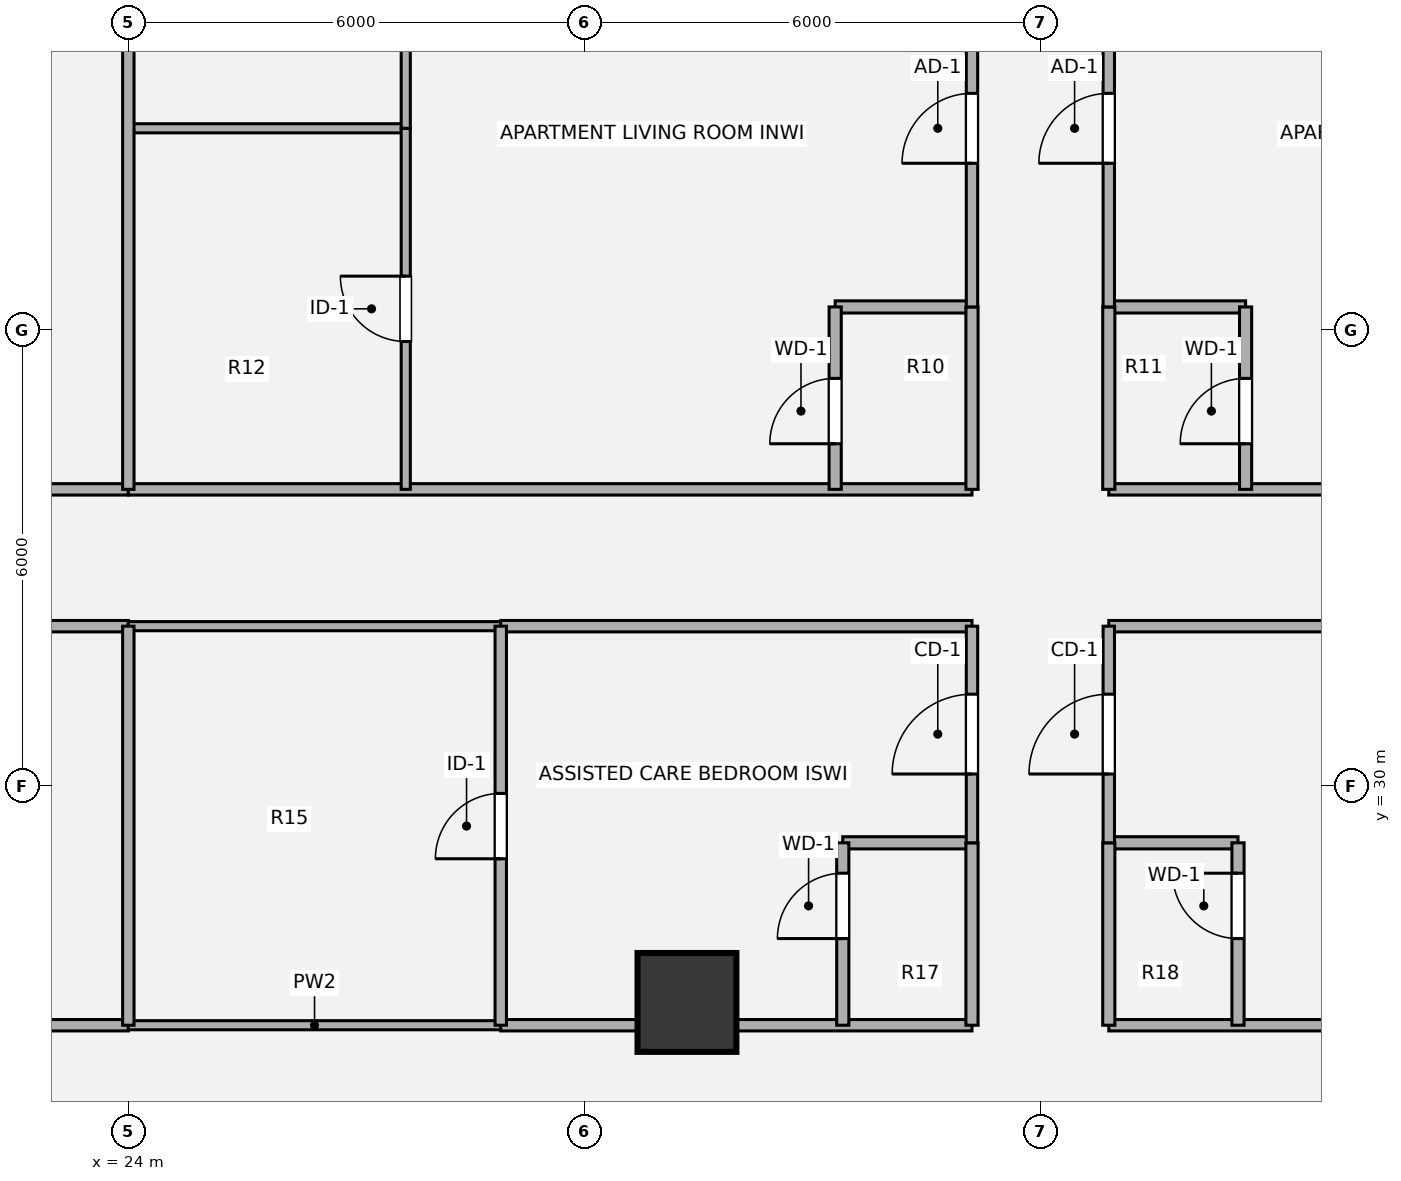
"""IFC4 building model, lengths in metres.
Left out: names, types, materials, properties, quantities, classifications, styles, units other than length and angle.
Written with IfcOpenShell. Run it as: python <this file> out.ifc"""

import sys

from ifc_helpers import new_model, si_unit, direction, frame, frame_2d, origin, origin_2d, place, context, subcontext, project, spatial, rectangle, hollow_circle, extrude, source, transform, mapped, element, fill, save


model = new_model("IFC4")
c1 = context("Model", 3, precision=1e-05, world=origin(), true_north=direction((0.0, 1.0)))
c2 = subcontext(c1, "Body", "Model", "MODEL_VIEW")
j1 = project(units=[si_unit("LENGTHUNIT", "METRE"), si_unit("PLANEANGLEUNIT", "RADIAN")], contexts=[c1])
p1 = place(None, origin())
s1 = spatial("IfcSite", under=j1, at=p1, CompositionType="ELEMENT")
p2 = place(p1, origin())
s2 = spatial("IfcBuilding", under=s1, at=p2, CompositionType="ELEMENT")
p3 = place(p2, frame((0.0, 0.0, 93.6)))
s3 = spatial("IfcBuildingStorey", under=s2, at=p3, CompositionType="ELEMENT", Elevation=93.6)
m1 = source(origin(), c2, "Body", "SweptSolid", [
    extrude(hollow_circle(Radius=0.65, WallThickness=0.045, at=origin_2d()), origin(), (0.0, 0.0, 1.0), 3.78),
])
p4 = place(p3, frame((31.35, 27.15, 0.0), z_axis=(0.0, 0.0, 1.0), x_axis=(1.0, 0.0, 0.0)))
e1 = element("IfcColumn", 1, at=p4, inside=s3, PredefinedType="COLUMN", context=c2, shape_type="MappedRepresentation", body=[
    mapped(m1, transform((0.0, 0.0, 0.0), x_axis=(1.0, 0.0, 0.0), y_axis=(0.0, 1.0, 0.0), z_axis=(0.0, 0.0, 1.0), scale=1.0)),
])
p5 = place(p3, frame((14.051, 26.85, 0.0), z_axis=(0.0, 0.0, 1.0), x_axis=(1.0, 0.0, 0.0)))
e2 = element("IfcWall", 2, at=p5, inside=s3, PredefinedType="PARTITIONING", context=c2, shape_type="SweptSolid", body=[
    extrude(rectangle(XDim=9.949, YDim=0.15, at=frame_2d((4.974, 0.0))), origin(), (0.0, 0.0, 1.0), 3.055),
])
p6 = place(p3, frame((24.0, 26.85, 0.0), z_axis=(0.0, 0.0, 1.0), x_axis=(1.0, 0.0, 0.0)))
e3 = element("IfcWall", 3, at=p6, inside=s3, PredefinedType="PARTITIONING", context=c2, shape_type="SweptSolid", body=[
    extrude(rectangle(XDim=4.9, YDim=0.12, at=frame_2d((2.45, 0.0))), origin(), (0.0, 0.0, 1.0), 3.055),
])
for number, where, z_axis, x_axis in (
    (4, (28.9, 26.85, 0.0), (0.0, 0.0, 1.0), (1.0, 0.0, 0.0)),
    (5, (36.9, 26.85, 0.0), (0.0, 0.0, 1.0), (1.0, 0.0, 0.0)),
):
    element("IfcWall", number, at=place(p3, frame(where, z_axis=z_axis, x_axis=x_axis)), inside=s3, PredefinedType="PARTITIONING", context=c2, shape_type="SweptSolid", body=[
        extrude(rectangle(XDim=6.2, YDim=0.15, at=frame_2d((3.1, 0.0))), origin(), (0.0, 0.0, 1.0), 2.903),
    ])
for number, where, z_axis, x_axis in (
    (6, (33.4, 29.25, 0.0), (0.0, 0.0, 1.0), (1.0, 0.0, 0.0)),
    (7, (36.9, 29.25, 0.0), (0.0, 0.0, 1.0), (1.0, 0.0, 0.0)),
):
    element("IfcWall", number, at=place(p3, frame(where, z_axis=z_axis, x_axis=x_axis)), inside=s3, PredefinedType="PLUMBINGWALL", context=c2, shape_type="SweptSolid", body=[
        extrude(rectangle(XDim=1.7, YDim=0.16, at=frame_2d((0.85, 0.0))), origin(), (0.0, 0.0, 1.0), 3.259),
    ])
p7 = place(p3, frame((13.98, 32.1, 0.0), z_axis=(0.0, 0.0, 1.0), x_axis=(1.0, 0.0, 0.0)))
e8 = element("IfcWall", 8, at=p7, inside=s3, PredefinedType="PARTITIONING", context=c2, shape_type="SweptSolid", body=[
    extrude(rectangle(XDim=10.02, YDim=0.15, at=frame_2d((5.01, 0.0))), origin(), (0.0, 0.0, 1.0), 2.982),
])
p8 = place(p7, frame((6.695, 0.0, 0.0)))
e9 = element("IfcOpeningElement", 9, at=p8, cuts=e8, PredefinedType="OPENING", context=c2, shape_type="SweptSolid", body=[
    extrude(rectangle(XDim=1.05, YDim=2.1, at=origin_2d()), frame((0.525, 0.085, 1.05), z_axis=(0.0, -1.0, 0.0), x_axis=(1.0, 0.0, 0.0)), (0.0, 0.0, 1.0), 0.17),
])
p9 = place(p3, frame((24.0, 32.1, 0.0), z_axis=(0.0, 0.0, 1.0), x_axis=(1.0, 0.0, 0.0)))
e10 = element("IfcWall", 10, at=p9, inside=s3, PredefinedType="PARTITIONING", context=c2, shape_type="SweptSolid", body=[
    extrude(rectangle(XDim=4.9, YDim=0.12, at=frame_2d((2.45, 0.0))), origin(), (0.0, 0.0, 1.0), 2.982),
])
for number, where, z_axis, x_axis in (
    (11, (28.9, 32.1, 0.0), (0.0, 0.0, 1.0), (1.0, 0.0, 0.0)),
    (12, (36.9, 32.1, 0.0), (0.0, 0.0, 1.0), (1.0, 0.0, 0.0)),
):
    element("IfcWall", number, at=place(p3, frame(where, z_axis=z_axis, x_axis=x_axis)), inside=s3, PredefinedType="PARTITIONING", context=c2, shape_type="SweptSolid", body=[
        extrude(rectangle(XDim=6.2, YDim=0.15, at=frame_2d((3.1, 0.0))), origin(), (0.0, 0.0, 1.0), 2.982),
    ])
p10 = place(p3, frame((13.98, 33.9, 0.0), z_axis=(0.0, 0.0, 1.0), x_axis=(1.0, 0.0, 0.0)))
e13 = element("IfcWall", 13, at=p10, inside=s3, PredefinedType="PARTITIONING", context=c2, shape_type="SweptSolid", body=[
    extrude(rectangle(XDim=10.02, YDim=0.15, at=frame_2d((5.01, 0.0))), origin(), (0.0, 0.0, 1.0), 2.982),
])
p11 = place(p10, frame((6.695, 0.0, 0.0)))
e14 = element("IfcOpeningElement", 14, at=p11, cuts=e13, PredefinedType="OPENING", context=c2, shape_type="SweptSolid", body=[
    extrude(rectangle(XDim=1.05, YDim=2.1, at=origin_2d()), frame((0.525, 0.085, 1.05), z_axis=(0.0, -1.0, 0.0), x_axis=(1.0, 0.0, 0.0)), (0.0, 0.0, 1.0), 0.17),
])
for number, where, z_axis, x_axis in (
    (15, (24.0, 33.9, 0.0), (0.0, 0.0, 1.0), (1.0, 0.0, 0.0)),
    (16, (36.9, 33.9, 0.0), (0.0, 0.0, 1.0), (1.0, 0.0, 0.0)),
):
    element("IfcWall", number, at=place(p3, frame(where, z_axis=z_axis, x_axis=x_axis)), inside=s3, PredefinedType="PARTITIONING", context=c2, shape_type="SweptSolid", body=[
        extrude(rectangle(XDim=11.1, YDim=0.15, at=frame_2d((5.55, 0.0))), origin(), (0.0, 0.0, 1.0), 2.982),
    ])
for number, where, z_axis, x_axis in (
    (17, (33.3, 36.3, 0.0), (0.0, 0.0, 1.0), (1.0, 0.0, 0.0)),
    (18, (36.9, 36.3, 0.0), (0.0, 0.0, 1.0), (1.0, 0.0, 0.0)),
):
    element("IfcWall", number, at=place(p3, frame(where, z_axis=z_axis, x_axis=x_axis)), inside=s3, PredefinedType="PLUMBINGWALL", context=c2, shape_type="SweptSolid", body=[
        extrude(rectangle(XDim=1.8, YDim=0.16, at=frame_2d((0.9, 0.0))), origin(), (0.0, 0.0, 1.0), 3.259),
    ])
p12 = place(p3, frame((24.0, 38.65, 0.0), z_axis=(0.0, 0.0, 1.0), x_axis=(1.0, 0.0, 0.0)))
e19 = element("IfcWall", 19, at=p12, inside=s3, PredefinedType="PARTITIONING", context=c2, shape_type="SweptSolid", body=[
    extrude(rectangle(XDim=3.65, YDim=0.12, at=frame_2d((1.825, 0.0))), origin(), (0.0, 0.0, 1.0), 2.903),
])
p13 = place(p3, frame((24.0, 26.85, 0.0), z_axis=(0.0, 0.0, 1.0), x_axis=(0.0, 1.0, 0.0)))
e20 = element("IfcWall", 20, at=p13, inside=s3, PredefinedType="PARTITIONING", context=c2, shape_type="SweptSolid", body=[
    extrude(rectangle(XDim=5.25, YDim=0.15, at=frame_2d((2.625, 0.0))), origin(), (0.0, 0.0, 1.0), 3.5),
])
p14 = place(p3, frame((24.0, 33.9, 0.0), z_axis=(0.0, 0.0, 1.0), x_axis=(0.0, 1.0, 0.0)))
e21 = element("IfcWall", 21, at=p14, inside=s3, PredefinedType="PARTITIONING", context=c2, shape_type="SweptSolid", body=[
    extrude(rectangle(XDim=13.421, YDim=0.15, at=frame_2d((6.71, 0.0))), origin(), (0.0, 0.0, 1.0), 3.5),
])
p15 = place(p3, frame((27.65, 33.9, 0.0), z_axis=(0.0, 0.0, 1.0), x_axis=(0.0, 1.0, 0.0)))
e22 = element("IfcWall", 22, at=p15, inside=s3, PredefinedType="PARTITIONING", context=c2, shape_type="SweptSolid", body=[
    extrude(rectangle(XDim=4.75, YDim=0.12, at=frame_2d((2.375, 0.0))), origin(), (0.0, 0.0, 1.0), 3.5),
])
p16 = place(p15, frame((1.945, 0.0, 0.0)))
e23 = element("IfcOpeningElement", 23, at=p16, cuts=e22, PredefinedType="OPENING", context=c2, shape_type="SweptSolid", body=[
    extrude(rectangle(XDim=0.86, YDim=2.1, at=origin_2d()), frame((0.43, 0.07, 1.05), z_axis=(0.0, -1.0, 0.0), x_axis=(1.0, 0.0, 0.0)), (0.0, 0.0, 1.0), 0.14),
])
p17 = place(p3, frame((27.65, 38.65, 0.0), z_axis=(0.0, 0.0, 1.0), x_axis=(0.0, 1.0, 0.0)))
e24 = element("IfcWall", 24, at=p17, inside=s3, PredefinedType="PARTITIONING", context=c2, shape_type="SweptSolid", body=[
    extrude(rectangle(XDim=4.75, YDim=0.12, at=frame_2d((2.375, 0.0))), origin(), (0.0, 0.0, 1.0), 3.5),
])
p18 = place(p17, frame((1.945, 0.0, 0.0)))
e25 = element("IfcOpeningElement", 25, at=p18, cuts=e24, PredefinedType="OPENING", context=c2, shape_type="SweptSolid", body=[
    extrude(rectangle(XDim=0.86, YDim=2.1, at=origin_2d()), frame((0.43, 0.07, 1.05), z_axis=(0.0, -1.0, 0.0), x_axis=(1.0, 0.0, 0.0)), (0.0, 0.0, 1.0), 0.14),
])
p19 = place(p3, frame((28.9, 26.85, 0.0), z_axis=(0.0, 0.0, 1.0), x_axis=(0.0, 1.0, 0.0)))
e26 = element("IfcWall", 26, at=p19, inside=s3, PredefinedType="PARTITIONING", context=c2, shape_type="SweptSolid", body=[
    extrude(rectangle(XDim=5.25, YDim=0.15, at=frame_2d((2.625, 0.0))), origin(), (0.0, 0.0, 1.0), 3.5),
])
p20 = place(p19, frame((2.19, 0.0, 0.0)))
e27 = element("IfcOpeningElement", 27, at=p20, cuts=e26, PredefinedType="OPENING", context=c2, shape_type="SweptSolid", body=[
    extrude(rectangle(XDim=0.86, YDim=2.1, at=origin_2d()), frame((0.43, 0.085, 1.05), z_axis=(0.0, -1.0, 0.0), x_axis=(1.0, 0.0, 0.0)), (0.0, 0.0, 1.0), 0.17),
])
p21 = place(p3, frame((33.3, 33.9, 0.0), z_axis=(0.0, 0.0, 1.0), x_axis=(0.0, 1.0, 0.0)))
e28 = element("IfcWall", 28, at=p21, inside=s3, PredefinedType="PLUMBINGWALL", context=c2, shape_type="SweptSolid", body=[
    extrude(rectangle(XDim=2.4, YDim=0.16, at=frame_2d((1.2, 0.0))), origin(), (0.0, 0.0, 1.0), 3.5),
])
p22 = place(p21, frame((0.6, 0.0, 0.0)))
e29 = element("IfcOpeningElement", 29, at=p22, cuts=e28, PredefinedType="OPENING", context=c2, shape_type="SweptSolid", body=[
    extrude(rectangle(XDim=0.86, YDim=2.1, at=origin_2d()), frame((0.43, 0.09, 1.05), z_axis=(0.0, -1.0, 0.0), x_axis=(1.0, 0.0, 0.0)), (0.0, 0.0, 1.0), 0.18),
])
p23 = place(p3, frame((33.4, 26.85, 0.0), z_axis=(0.0, 0.0, 1.0), x_axis=(0.0, 1.0, 0.0)))
e30 = element("IfcWall", 30, at=p23, inside=s3, PredefinedType="PLUMBINGWALL", context=c2, shape_type="SweptSolid", body=[
    extrude(rectangle(XDim=2.4, YDim=0.16, at=frame_2d((1.2, 0.0))), origin(), (0.0, 0.0, 1.0), 3.5),
])
p24 = place(p23, frame((1.14, 0.0, 0.0)))
e31 = element("IfcOpeningElement", 31, at=p24, cuts=e30, PredefinedType="OPENING", context=c2, shape_type="SweptSolid", body=[
    extrude(rectangle(XDim=0.86, YDim=2.1, at=origin_2d()), frame((0.43, 0.09, 1.05), z_axis=(0.0, -1.0, 0.0), x_axis=(1.0, 0.0, 0.0)), (0.0, 0.0, 1.0), 0.18),
])
p25 = place(p3, frame((35.1, 26.85, 0.0), z_axis=(0.0, 0.0, 1.0), x_axis=(0.0, 1.0, 0.0)))
e32 = element("IfcWall", 32, at=p25, inside=s3, PredefinedType="PLUMBINGWALL", context=c2, shape_type="SweptSolid", body=[
    extrude(rectangle(XDim=2.4, YDim=0.16, at=frame_2d((1.2, 0.0))), origin(), (0.0, 0.0, 1.0), 3.5),
])
p26 = place(p3, frame((35.1, 29.25, 0.0), z_axis=(0.0, 0.0, 1.0), x_axis=(0.0, 1.0, 0.0)))
e33 = element("IfcWall", 33, at=p26, inside=s3, PredefinedType="PARTITIONING", context=c2, shape_type="SweptSolid", body=[
    extrude(rectangle(XDim=2.85, YDim=0.15, at=frame_2d((1.425, 0.0))), origin(), (0.0, 0.0, 1.0), 3.5),
])
p27 = place(p26, frame((0.905, 0.0, 0.0)))
e34 = element("IfcOpeningElement", 34, at=p27, cuts=e33, PredefinedType="OPENING", context=c2, shape_type="SweptSolid", body=[
    extrude(rectangle(XDim=1.05, YDim=2.1, at=origin_2d()), frame((0.525, 0.085, 1.05), z_axis=(0.0, -1.0, 0.0), x_axis=(1.0, 0.0, 0.0)), (0.0, 0.0, 1.0), 0.17),
])
p28 = place(p3, frame((35.1, 33.9, 0.0), z_axis=(0.0, 0.0, 1.0), x_axis=(0.0, 1.0, 0.0)))
e35 = element("IfcWall", 35, at=p28, inside=s3, PredefinedType="PLUMBINGWALL", context=c2, shape_type="SweptSolid", body=[
    extrude(rectangle(XDim=2.4, YDim=0.16, at=frame_2d((1.2, 0.0))), origin(), (0.0, 0.0, 1.0), 3.5),
])
p29 = place(p3, frame((35.1, 36.3, 0.0), z_axis=(0.0, 0.0, 1.0), x_axis=(0.0, 1.0, 0.0)))
e36 = element("IfcWall", 36, at=p29, inside=s3, PredefinedType="PARTITIONING", context=c2, shape_type="SweptSolid", body=[
    extrude(rectangle(XDim=4.7, YDim=0.15, at=frame_2d((2.35, 0.0))), origin(), (0.0, 0.0, 1.0), 3.5),
])
p30 = place(p29, frame((1.89, 0.0, 0.0)))
e37 = element("IfcOpeningElement", 37, at=p30, cuts=e36, PredefinedType="OPENING", context=c2, shape_type="SweptSolid", body=[
    extrude(rectangle(XDim=0.92, YDim=2.1, at=origin_2d()), frame((0.46, 0.085, 1.05), z_axis=(0.0, -1.0, 0.0), x_axis=(1.0, 0.0, 0.0)), (0.0, 0.0, 1.0), 0.17),
])
p31 = place(p3, frame((36.9, 26.85, 0.0), z_axis=(0.0, 0.0, 1.0), x_axis=(0.0, 1.0, 0.0)))
e38 = element("IfcWall", 38, at=p31, inside=s3, PredefinedType="PLUMBINGWALL", context=c2, shape_type="SweptSolid", body=[
    extrude(rectangle(XDim=2.4, YDim=0.16, at=frame_2d((1.2, 0.0))), origin(), (0.0, 0.0, 1.0), 3.5),
])
p32 = place(p3, frame((36.9, 29.25, 0.0), z_axis=(0.0, 0.0, 1.0), x_axis=(0.0, 1.0, 0.0)))
e39 = element("IfcWall", 39, at=p32, inside=s3, PredefinedType="PARTITIONING", context=c2, shape_type="SweptSolid", body=[
    extrude(rectangle(XDim=2.85, YDim=0.15, at=frame_2d((1.425, 0.0))), origin(), (0.0, 0.0, 1.0), 3.5),
])
p33 = place(p32, frame((0.905, 0.0, 0.0)))
e40 = element("IfcOpeningElement", 40, at=p33, cuts=e39, PredefinedType="OPENING", context=c2, shape_type="SweptSolid", body=[
    extrude(rectangle(XDim=1.05, YDim=2.1, at=origin_2d()), frame((0.525, 0.085, 1.05), z_axis=(0.0, -1.0, 0.0), x_axis=(1.0, 0.0, 0.0)), (0.0, 0.0, 1.0), 0.17),
])
p34 = place(p3, frame((36.9, 33.9, 0.0), z_axis=(0.0, 0.0, 1.0), x_axis=(0.0, 1.0, 0.0)))
e41 = element("IfcWall", 41, at=p34, inside=s3, PredefinedType="PLUMBINGWALL", context=c2, shape_type="SweptSolid", body=[
    extrude(rectangle(XDim=2.4, YDim=0.16, at=frame_2d((1.2, 0.0))), origin(), (0.0, 0.0, 1.0), 3.5),
])
p35 = place(p3, frame((36.9, 36.3, 0.0), z_axis=(0.0, 0.0, 1.0), x_axis=(0.0, 1.0, 0.0)))
e42 = element("IfcWall", 42, at=p35, inside=s3, PredefinedType="PARTITIONING", context=c2, shape_type="SweptSolid", body=[
    extrude(rectangle(XDim=4.7, YDim=0.15, at=frame_2d((2.35, 0.0))), origin(), (0.0, 0.0, 1.0), 3.5),
])
p36 = place(p35, frame((1.89, 0.0, 0.0)))
e43 = element("IfcOpeningElement", 43, at=p36, cuts=e42, PredefinedType="OPENING", context=c2, shape_type="SweptSolid", body=[
    extrude(rectangle(XDim=0.92, YDim=2.1, at=origin_2d()), frame((0.46, 0.085, 1.05), z_axis=(0.0, -1.0, 0.0), x_axis=(1.0, 0.0, 0.0)), (0.0, 0.0, 1.0), 0.17),
])
p37 = place(p3, frame((38.6, 26.85, 0.0), z_axis=(0.0, 0.0, 1.0), x_axis=(0.0, 1.0, 0.0)))
e44 = element("IfcWall", 44, at=p37, inside=s3, PredefinedType="PLUMBINGWALL", context=c2, shape_type="SweptSolid", body=[
    extrude(rectangle(XDim=2.4, YDim=0.16, at=frame_2d((1.2, 0.0))), origin(), (0.0, 0.0, 1.0), 3.5),
])
p38 = place(p37, frame((1.14, 0.0, 0.0)))
e45 = element("IfcOpeningElement", 45, at=p38, cuts=e44, PredefinedType="OPENING", context=c2, shape_type="SweptSolid", body=[
    extrude(rectangle(XDim=0.86, YDim=2.1, at=origin_2d()), frame((0.43, 0.09, 1.05), z_axis=(0.0, -1.0, 0.0), x_axis=(1.0, 0.0, 0.0)), (0.0, 0.0, 1.0), 0.18),
])
p39 = place(p3, frame((38.7, 33.9, 0.0), z_axis=(0.0, 0.0, 1.0), x_axis=(0.0, 1.0, 0.0)))
e46 = element("IfcWall", 46, at=p39, inside=s3, PredefinedType="PLUMBINGWALL", context=c2, shape_type="SweptSolid", body=[
    extrude(rectangle(XDim=2.4, YDim=0.16, at=frame_2d((1.2, 0.0))), origin(), (0.0, 0.0, 1.0), 3.5),
])
p40 = place(p39, frame((0.6, 0.0, 0.0)))
e47 = element("IfcOpeningElement", 47, at=p40, cuts=e46, PredefinedType="OPENING", context=c2, shape_type="SweptSolid", body=[
    extrude(rectangle(XDim=0.86, YDim=2.1, at=origin_2d()), frame((0.43, 0.09, 1.05), z_axis=(0.0, -1.0, 0.0), x_axis=(1.0, 0.0, 0.0)), (0.0, 0.0, 1.0), 0.18),
])
m2 = source(origin(), c2, "Body", "SweptSolid", [
    extrude(rectangle(XDim=0.86, YDim=2.1, at=origin_2d()), frame((0.43, 0.025, 1.05), z_axis=(0.0, -1.0, 0.0), x_axis=(1.0, 0.0, 0.0)), (0.0, 0.0, 1.0), 0.05),
])
p41 = place(p16, origin())
e48 = element("IfcDoor", 48, at=p41, inside=s3, OperationType="SINGLE_SWING_RIGHT", PredefinedType="DOOR", context=c2, shape_type="MappedRepresentation", body=[
    mapped(m2, transform((0.0, 0.0, 0.0), x_axis=(1.0, 0.0, 0.0), y_axis=(0.0, 1.0, 0.0), z_axis=(0.0, 0.0, 1.0), scale=1.0)),
])
fill(e23, e48)
p42 = place(p20, origin())
e49 = element("IfcDoor", 49, at=p42, inside=s3, OperationType="SINGLE_SWING_LEFT", PredefinedType="DOOR", context=c2, shape_type="MappedRepresentation", body=[
    mapped(m2, transform((0.0, 0.0, 0.0), x_axis=(1.0, 0.0, 0.0), y_axis=(0.0, 1.0, 0.0), z_axis=(0.0, 0.0, 1.0), scale=1.0)),
])
fill(e27, e49)
m3 = source(origin(), c2, "Body", "SweptSolid", [
    extrude(rectangle(XDim=0.86, YDim=2.1, at=origin_2d()), frame((0.43, 0.025, 1.05), z_axis=(0.0, -1.0, 0.0), x_axis=(1.0, 0.0, 0.0)), (0.0, 0.0, 1.0), 0.05),
])
p43 = place(p22, origin())
e50 = element("IfcDoor", 50, at=p43, inside=s3, OperationType="SINGLE_SWING_LEFT", PredefinedType="DOOR", context=c2, shape_type="MappedRepresentation", body=[
    mapped(m3, transform((0.0, 0.0, 0.0), x_axis=(1.0, 0.0, 0.0), y_axis=(0.0, 1.0, 0.0), z_axis=(0.0, 0.0, 1.0), scale=1.0)),
])
fill(e29, e50)
p44 = place(p24, origin())
e51 = element("IfcDoor", 51, at=p44, inside=s3, OperationType="SINGLE_SWING_LEFT", PredefinedType="DOOR", context=c2, shape_type="MappedRepresentation", body=[
    mapped(m3, transform((0.0, 0.0, 0.0), x_axis=(1.0, 0.0, 0.0), y_axis=(0.0, 1.0, 0.0), z_axis=(0.0, 0.0, 1.0), scale=1.0)),
])
fill(e31, e51)
m4 = source(origin(), c2, "Body", "SweptSolid", [
    extrude(rectangle(XDim=1.05, YDim=2.1, at=origin_2d()), frame((0.525, 0.025, 1.05), z_axis=(0.0, -1.0, 0.0), x_axis=(1.0, 0.0, 0.0)), (0.0, 0.0, 1.0), 0.05),
])
p45 = place(p27, origin())
e52 = element("IfcDoor", 52, at=p45, inside=s3, OperationType="SINGLE_SWING_LEFT", PredefinedType="DOOR", context=c2, shape_type="MappedRepresentation", body=[
    mapped(m4, transform((0.0, 0.0, 0.0), x_axis=(1.0, 0.0, 0.0), y_axis=(0.0, 1.0, 0.0), z_axis=(0.0, 0.0, 1.0), scale=1.0)),
])
fill(e34, e52)
m5 = source(origin(), c2, "Body", "SweptSolid", [
    extrude(rectangle(XDim=0.92, YDim=2.1, at=origin_2d()), frame((0.46, 0.025, 1.05), z_axis=(0.0, -1.0, 0.0), x_axis=(1.0, 0.0, 0.0)), (0.0, 0.0, 1.0), 0.05),
])
p46 = place(p30, origin())
e53 = element("IfcDoor", 53, at=p46, inside=s3, OperationType="SINGLE_SWING_LEFT", PredefinedType="DOOR", context=c2, shape_type="MappedRepresentation", body=[
    mapped(m5, transform((0.0, 0.0, 0.0), x_axis=(1.0, 0.0, 0.0), y_axis=(0.0, 1.0, 0.0), z_axis=(0.0, 0.0, 1.0), scale=1.0)),
])
fill(e37, e53)
p47 = place(p33, origin())
e54 = element("IfcDoor", 54, at=p47, inside=s3, OperationType="SINGLE_SWING_LEFT", PredefinedType="DOOR", context=c2, shape_type="MappedRepresentation", body=[
    mapped(m4, transform((0.0, 0.0, 0.0), x_axis=(1.0, 0.0, 0.0), y_axis=(0.0, 1.0, 0.0), z_axis=(0.0, 0.0, 1.0), scale=1.0)),
])
fill(e40, e54)
p48 = place(p36, origin())
e55 = element("IfcDoor", 55, at=p48, inside=s3, OperationType="SINGLE_SWING_LEFT", PredefinedType="DOOR", context=c2, shape_type="MappedRepresentation", body=[
    mapped(m5, transform((0.0, 0.0, 0.0), x_axis=(1.0, 0.0, 0.0), y_axis=(0.0, 1.0, 0.0), z_axis=(0.0, 0.0, 1.0), scale=1.0)),
])
fill(e43, e55)
p49 = place(p38, origin())
e56 = element("IfcDoor", 56, at=p49, inside=s3, OperationType="SINGLE_SWING_RIGHT", PredefinedType="DOOR", context=c2, shape_type="MappedRepresentation", body=[
    mapped(m3, transform((0.0, 0.0, 0.0), x_axis=(1.0, 0.0, 0.0), y_axis=(0.0, 1.0, 0.0), z_axis=(0.0, 0.0, 1.0), scale=1.0)),
])
fill(e45, e56)
p50 = place(p40, origin())
e57 = element("IfcDoor", 57, at=p50, inside=s3, OperationType="SINGLE_SWING_LEFT", PredefinedType="DOOR", context=c2, shape_type="MappedRepresentation", body=[
    mapped(m3, transform((0.0, 0.0, 0.0), x_axis=(1.0, 0.0, 0.0), y_axis=(0.0, 1.0, 0.0), z_axis=(0.0, 0.0, 1.0), scale=1.0)),
])
fill(e47, e57)
save(model, sys.argv[1])
